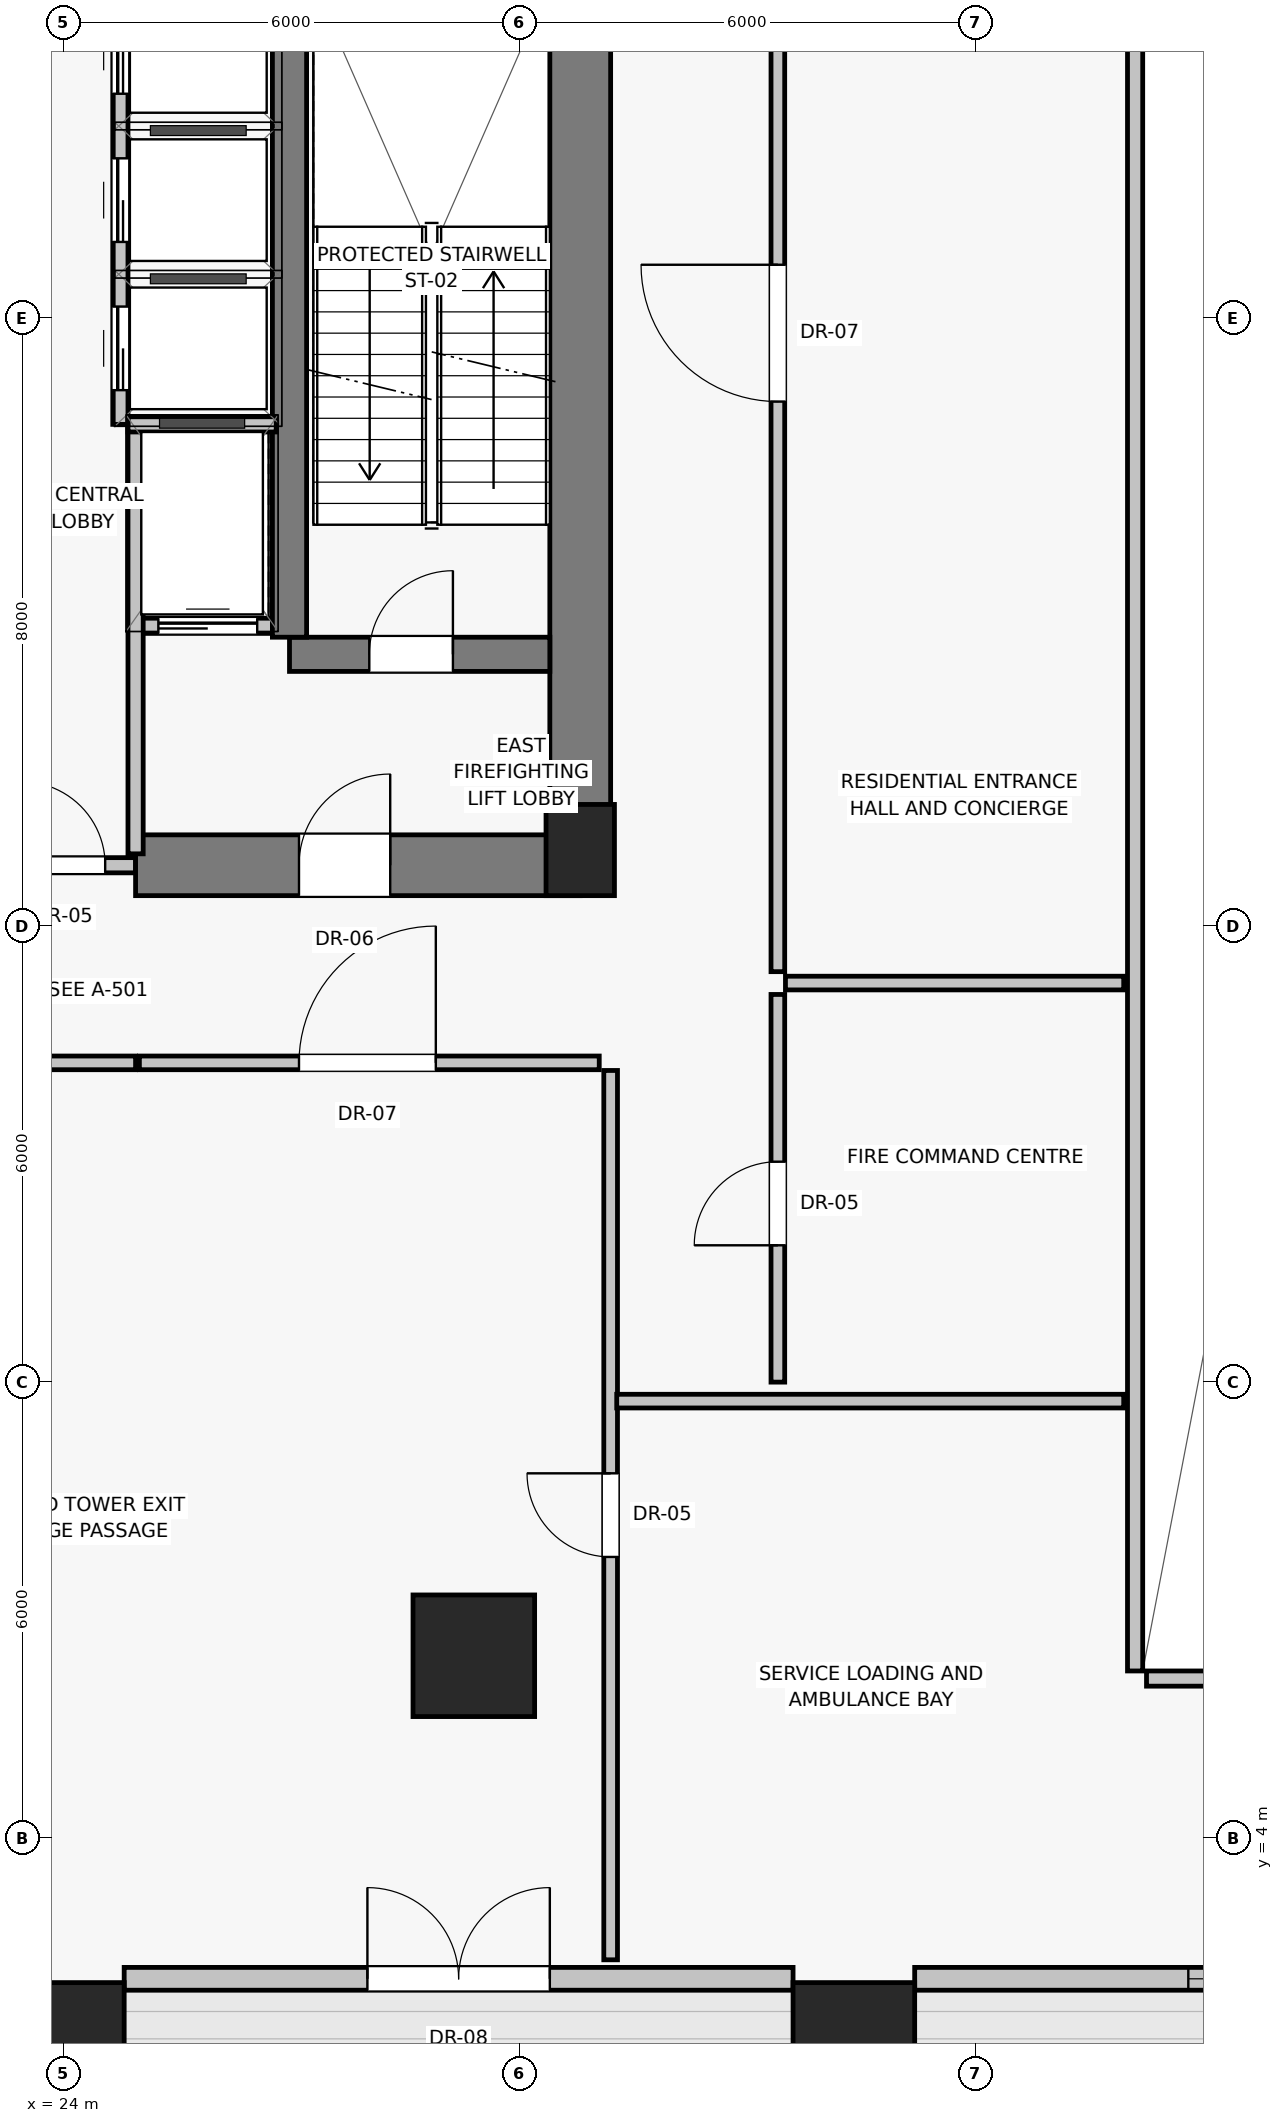
"""IFC4 building model, lengths in metres.
Left out: names, types, materials, properties, quantities, classifications, styles, units other than length and angle.
Written with IfcOpenShell. Run it as: python <this file> out.ifc"""

import sys

from ifc_helpers import new_model, si_unit, direction, frame, frame_2d, origin, origin_2d, place, context, subcontext, project, spatial, rectangle, extrude, source, transform, mapped, element, fill, save


model = new_model("IFC4")
c1 = context("Model", 3, precision=1e-05, world=origin(), true_north=direction((0.0, 1.0)))
c2 = subcontext(c1, "Body", "Model", "MODEL_VIEW")
j1 = project(units=[si_unit("LENGTHUNIT", "METRE"), si_unit("PLANEANGLEUNIT", "RADIAN")], contexts=[c1])
p1 = place(None, origin())
s1 = spatial("IfcSite", under=j1, at=p1, CompositionType="ELEMENT")
p2 = place(p1, origin())
s2 = spatial("IfcBuilding", under=s1, at=p2, CompositionType="ELEMENT")
p3 = place(p2, origin())
s3 = spatial("IfcBuildingStorey", under=s2, at=p3, CompositionType="ELEMENT", Elevation=0.0)
p4 = place(p3, frame((30.8, 17.0, 0.0), z_axis=(0.0, 0.0, 1.0), x_axis=(1.0, 0.0, 0.0)))
e1 = element("IfcColumn", 1, at=p4, inside=s3, PredefinedType="PILASTER", context=c2, shape_type="SweptSolid", body=[
    extrude(rectangle(XDim=0.9, YDim=1.2, at=origin_2d()), origin(), (0.0, 0.0, 1.0), 5.2),
])
for number, where, z_axis, x_axis in (
    (2, (24.0, 1.3, 0.0), (0.0, 0.0, 1.0), (1.0, 0.0, 0.0)),
    (3, (34.4, 1.3, 0.0), (0.0, 0.0, 1.0), (1.0, 0.0, 0.0)),
    (4, (29.4, 6.4, 0.0), (0.0, 0.0, 1.0), (1.0, 0.0, 0.0)),
):
    element("IfcColumn", number, at=place(p3, frame(where, z_axis=z_axis, x_axis=x_axis)), inside=s3, PredefinedType="COLUMN", context=c2, shape_type="SweptSolid", body=[
        extrude(rectangle(XDim=1.6, YDim=1.6, at=origin_2d()), origin(), (0.0, 0.0, 1.0), 5.2),
    ])
p5 = place(p3, frame((24.8, 2.15, 0.0), z_axis=(0.0, 0.0, 1.0), x_axis=(1.0, 0.0, 0.0)))
e5 = element("IfcWall", 5, at=p5, inside=s3, PredefinedType="SOLIDWALL", context=c2, shape_type="SweptSolid", body=[
    extrude(rectangle(XDim=8.8, YDim=0.3, at=frame_2d((4.4, 0.0))), origin(), (0.0, 0.0, 1.0), 3.8),
])
p6 = place(p5, frame((3.2, 0.0, 0.0)))
e6 = element("IfcOpeningElement", 6, at=p6, cuts=e5, PredefinedType="OPENING", context=c2, shape_type="SweptSolid", body=[
    extrude(rectangle(XDim=2.4, YDim=2.5, at=frame_2d((1.2, 1.25))), frame((0.0, 0.16, 0.0), z_axis=(0.0, -1.0, 0.0), x_axis=(1.0, 0.0, 0.0)), (0.0, 0.0, 1.0), 0.32),
])
p7 = place(p3, frame((35.2, 2.15, 0.0), z_axis=(0.0, 0.0, 1.0), x_axis=(1.0, 0.0, 0.0)))
e7 = element("IfcWall", 7, at=p7, inside=s3, PredefinedType="SOLIDWALL", context=c2, shape_type="SweptSolid", body=[
    extrude(rectangle(XDim=10.8, YDim=0.3, at=frame_2d((5.4, 0.0))), origin(), (0.0, 0.0, 1.0), 3.8),
])
p8 = place(p7, frame((3.6, 0.0, 0.9)))
e8 = element("IfcOpeningElement", 8, at=p8, cuts=e7, PredefinedType="OPENING", context=c2, shape_type="SweptSolid", body=[
    extrude(rectangle(XDim=3.0, YDim=2.4, at=frame_2d((1.5, 1.2))), frame((0.0, 0.16, 0.0), z_axis=(0.0, -1.0, 0.0), x_axis=(1.0, 0.0, 0.0)), (0.0, 0.0, 1.0), 0.32),
])
p9 = place(p3, frame((38.1, 6.2, 0.0), z_axis=(0.0, 0.0, 1.0), x_axis=(0.0, 1.0, 0.0)))
e9 = element("IfcWall", 9, at=p9, inside=s3, PredefinedType="SOLIDWALL", context=c2, shape_type="SweptSolid", body=[
    extrude(rectangle(XDim=33.8, YDim=0.2, at=frame_2d((16.9, 0.0))), origin(), (0.0, 0.0, 1.0), 4.9),
])
p10 = place(p3, frame((38.25, 6.1, 0.0), z_axis=(0.0, 0.0, 1.0), x_axis=(1.0, 0.0, 0.0)))
e10 = element("IfcWall", 10, at=p10, inside=s3, PredefinedType="SOLIDWALL", context=c2, shape_type="SweptSolid", body=[
    extrude(rectangle(XDim=6.4, YDim=0.2, at=frame_2d((3.2, 0.0))), origin(), (0.0, 0.0, 1.0), 4.9),
])
p11 = place(p3, frame((30.8, 16.8, 0.0), z_axis=(0.0, 0.0, 1.0), x_axis=(0.0, 1.0, 0.0)))
e11 = element("IfcWall", 11, at=p11, inside=s3, PredefinedType="SHEAR", context=c2, shape_type="SweptSolid", body=[
    extrude(rectangle(XDim=14.2, YDim=0.8, at=frame_2d((7.1, 0.0))), origin(), (0.0, 0.0, 1.0), 4.9),
])
p12 = place(p3, frame((23.05, 16.8, 0.0), z_axis=(0.0, 0.0, 1.0), x_axis=(1.0, 0.0, 0.0)))
e12 = element("IfcWall", 12, at=p12, inside=s3, PredefinedType="SOLIDWALL", context=c2, shape_type="SweptSolid", body=[
    extrude(rectangle(XDim=1.9, YDim=0.2, at=frame_2d((0.95, 0.0))), origin(), (0.0, 0.0, 1.0), 4.05),
])
p13 = place(p12, frame((0.4, 0.0, 0.0)))
e13 = element("IfcOpeningElement", 13, at=p13, cuts=e12, PredefinedType="OPENING", context=c2, shape_type="SweptSolid", body=[
    extrude(rectangle(XDim=1.1, YDim=2.03, at=frame_2d((0.55, 1.015))), frame((0.0, 0.11, 0.0), z_axis=(0.0, -1.0, 0.0), x_axis=(1.0, 0.0, 0.0)), (0.0, 0.0, 1.0), 0.22),
])
p14 = place(p3, frame((24.95, 16.8, 0.0), z_axis=(0.0, 0.0, 1.0), x_axis=(1.0, 0.0, 0.0)))
e14 = element("IfcWall", 14, at=p14, inside=s3, PredefinedType="SHEAR", context=c2, shape_type="SweptSolid", body=[
    extrude(rectangle(XDim=5.85, YDim=0.8, at=frame_2d((2.925, 0.0))), origin(), (0.0, 0.0, 1.0), 4.9),
])
p15 = place(p14, frame((2.15, 0.0, 0.0)))
e15 = element("IfcOpeningElement", 15, at=p15, cuts=e14, PredefinedType="OPENING", context=c2, shape_type="SweptSolid", body=[
    extrude(rectangle(XDim=1.2, YDim=2.03, at=frame_2d((0.6, 1.015))), frame((0.0, 0.41, 0.0), z_axis=(0.0, -1.0, 0.0), x_axis=(1.0, 0.0, 0.0)), (0.0, 0.0, 1.0), 0.82),
])
p16 = place(p3, frame((24.95, 19.95, 0.0), z_axis=(0.0, 0.0, 1.0), x_axis=(1.0, 0.0, 0.0)))
e16 = element("IfcWall", 16, at=p16, inside=s3, PredefinedType="SOLIDWALL", context=c2, shape_type="SweptSolid", body=[
    extrude(rectangle(XDim=1.85, YDim=0.2, at=frame_2d((0.925, 0.0))), origin(), (0.0, 0.0, 1.0), 4.9),
])
p17 = place(p16, frame((0.3, 0.0, 0.0)))
e17 = element("IfcOpeningElement", 17, at=p17, cuts=e16, PredefinedType="OPENING", context=c2, shape_type="SweptSolid", body=[
    extrude(rectangle(XDim=1.3, YDim=2.25, at=frame_2d((0.65, 1.125))), frame((0.0, 0.11, 0.0), z_axis=(0.0, -1.0, 0.0), x_axis=(1.0, 0.0, 0.0)), (0.0, 0.0, 1.0), 0.22),
])
p18 = place(p3, frame((26.975, 19.575, 0.0), z_axis=(0.0, 0.0, 1.0), x_axis=(1.0, 0.0, 0.0)))
e18 = element("IfcWall", 18, at=p18, inside=s3, PredefinedType="SHEAR", context=c2, shape_type="SweptSolid", body=[
    extrude(rectangle(XDim=3.425, YDim=0.45, at=frame_2d((1.712, 0.0))), origin(), (0.0, 0.0, 1.0), 4.9),
])
p19 = place(p18, frame((1.05, 0.0, 0.0)))
e19 = element("IfcOpeningElement", 19, at=p19, cuts=e18, PredefinedType="OPENING", context=c2, shape_type="SweptSolid", body=[
    extrude(rectangle(XDim=1.1, YDim=2.03, at=frame_2d((0.55, 1.015))), frame((0.0, 0.235, 0.0), z_axis=(0.0, -1.0, 0.0), x_axis=(1.0, 0.0, 0.0)), (0.0, 0.0, 1.0), 0.47),
])
p20 = place(p3, frame((26.975, 19.8, 0.0), z_axis=(0.0, 0.0, 1.0), x_axis=(0.0, 1.0, 0.0)))
e20 = element("IfcWall", 20, at=p20, inside=s3, PredefinedType="SHEAR", context=c2, shape_type="SweptSolid", body=[
    extrude(rectangle(XDim=8.825, YDim=0.45, at=frame_2d((4.413, 0.0))), origin(), (0.0, 0.0, 1.0), 4.9),
])
p21 = place(p3, frame((24.95, 16.95, 0.0), z_axis=(0.0, 0.0, 1.0), x_axis=(0.0, 1.0, 0.0)))
e21 = element("IfcWall", 21, at=p21, inside=s3, PredefinedType="SOLIDWALL", context=c2, shape_type="SweptSolid", body=[
    extrude(rectangle(XDim=5.6, YDim=0.2, at=frame_2d((2.8, 0.0))), origin(), (0.0, 0.0, 1.0), 4.9),
])
p22 = place(p3, frame((24.85, 22.6, 0.0), z_axis=(0.0, 0.0, 1.0), x_axis=(1.0, 0.0, 0.0)))
e22 = element("IfcWall", 22, at=p22, inside=s3, PredefinedType="SOLIDWALL", context=c2, shape_type="SweptSolid", body=[
    extrude(rectangle(XDim=1.95, YDim=0.2, at=frame_2d((0.975, 0.0))), origin(), (0.0, 0.0, 1.0), 4.9),
])
p23 = place(p3, frame((24.75, 22.6, 0.0), z_axis=(0.0, 0.0, 1.0), x_axis=(0.0, 1.0, 0.0)))
e23 = element("IfcWall", 23, at=p23, inside=s3, PredefinedType="SOLIDWALL", context=c2, shape_type="SweptSolid", body=[
    extrude(rectangle(XDim=5.95, YDim=0.2, at=frame_2d((2.975, 0.0))), origin(), (0.0, 0.0, 1.0), 4.9),
])
p24 = place(p23, frame((0.45, 0.0, 0.0)))
e24 = element("IfcOpeningElement", 24, at=p24, cuts=e23, PredefinedType="OPENING", context=c2, shape_type="SweptSolid", body=[
    extrude(rectangle(XDim=1.1, YDim=2.08, at=frame_2d((0.55, 1.04))), frame((0.0, 0.11, 0.0), z_axis=(0.0, -1.0, 0.0), x_axis=(1.0, 0.0, 0.0)), (0.0, 0.0, 1.0), 0.22),
])
p25 = place(p23, frame((2.4, 0.0, 0.0)))
e25 = element("IfcOpeningElement", 25, at=p25, cuts=e23, PredefinedType="OPENING", context=c2, shape_type="SweptSolid", body=[
    extrude(rectangle(XDim=1.1, YDim=2.08, at=frame_2d((0.55, 1.04))), frame((0.0, 0.11, 0.0), z_axis=(0.0, -1.0, 0.0), x_axis=(1.0, 0.0, 0.0)), (0.0, 0.0, 1.0), 0.22),
])
p26 = place(p23, frame((4.35, 0.0, 0.0)))
e26 = element("IfcOpeningElement", 26, at=p26, cuts=e23, PredefinedType="OPENING", context=c2, shape_type="SweptSolid", body=[
    extrude(rectangle(XDim=1.1, YDim=2.08, at=frame_2d((0.55, 1.04))), frame((0.0, 0.11, 0.0), z_axis=(0.0, -1.0, 0.0), x_axis=(1.0, 0.0, 0.0)), (0.0, 0.0, 1.0), 0.22),
])
p27 = place(p3, frame((25.0, 14.2, 0.0), z_axis=(0.0, 0.0, 1.0), x_axis=(1.0, 0.0, 0.0)))
e27 = element("IfcWall", 27, at=p27, inside=s3, PredefinedType="PARTITIONING", context=c2, shape_type="SweptSolid", body=[
    extrude(rectangle(XDim=6.05, YDim=0.18, at=frame_2d((3.025, 0.0))), origin(), (0.0, 0.0, 1.0), 4.9),
])
p28 = place(p27, frame((2.1, 0.0, 0.0)))
e28 = element("IfcOpeningElement", 28, at=p28, cuts=e27, PredefinedType="OPENING", context=c2, shape_type="SweptSolid", body=[
    extrude(rectangle(XDim=1.8, YDim=2.25, at=frame_2d((0.9, 1.125))), frame((0.0, 0.1, 0.0), z_axis=(0.0, -1.0, 0.0), x_axis=(1.0, 0.0, 0.0)), (0.0, 0.0, 1.0), 0.2),
])
p29 = place(p3, frame((23.05, 14.2, 0.0), z_axis=(0.0, 0.0, 1.0), x_axis=(1.0, 0.0, 0.0)))
e29 = element("IfcWall", 29, at=p29, inside=s3, PredefinedType="PARTITIONING", context=c2, shape_type="SweptSolid", body=[
    extrude(rectangle(XDim=1.9, YDim=0.18, at=frame_2d((0.95, 0.0))), origin(), (0.0, 0.0, 1.0), 4.9),
])
p30 = place(p3, frame((31.2, 2.4, 0.0), z_axis=(0.0, 0.0, 1.0), x_axis=(0.0, 1.0, 0.0)))
e30 = element("IfcWall", 30, at=p30, inside=s3, PredefinedType="PARTITIONING", context=c2, shape_type="SweptSolid", body=[
    extrude(rectangle(XDim=11.7, YDim=0.18, at=frame_2d((5.85, 0.0))), origin(), (0.0, 0.0, 1.0), 4.9),
])
p31 = place(p30, frame((5.3, 0.0, 0.0)))
e31 = element("IfcOpeningElement", 31, at=p31, cuts=e30, PredefinedType="OPENING", context=c2, shape_type="SweptSolid", body=[
    extrude(rectangle(XDim=1.1, YDim=2.03, at=frame_2d((0.55, 1.015))), frame((0.0, 0.1, 0.0), z_axis=(0.0, -1.0, 0.0), x_axis=(1.0, 0.0, 0.0)), (0.0, 0.0, 1.0), 0.2),
])
p32 = place(p3, frame((33.4, 10.0, 0.0), z_axis=(0.0, 0.0, 1.0), x_axis=(0.0, 1.0, 0.0)))
e32 = element("IfcWall", 32, at=p32, inside=s3, PredefinedType="PARTITIONING", context=c2, shape_type="SweptSolid", body=[
    extrude(rectangle(XDim=5.1, YDim=0.18, at=frame_2d((2.55, 0.0))), origin(), (0.0, 0.0, 1.0), 4.9),
])
p33 = place(p32, frame((1.8, 0.0, 0.0)))
e33 = element("IfcOpeningElement", 33, at=p33, cuts=e32, PredefinedType="OPENING", context=c2, shape_type="SweptSolid", body=[
    extrude(rectangle(XDim=1.1, YDim=2.03, at=frame_2d((0.55, 1.015))), frame((0.0, 0.1, 0.0), z_axis=(0.0, -1.0, 0.0), x_axis=(1.0, 0.0, 0.0)), (0.0, 0.0, 1.0), 0.2),
])
p34 = place(p3, frame((33.4, 15.4, 0.0), z_axis=(0.0, 0.0, 1.0), x_axis=(0.0, 1.0, 0.0)))
e34 = element("IfcWall", 34, at=p34, inside=s3, PredefinedType="PARTITIONING", context=c2, shape_type="SweptSolid", body=[
    extrude(rectangle(XDim=18.0, YDim=0.18, at=frame_2d((9.0, 0.0))), origin(), (0.0, 0.0, 1.0), 4.9),
])
p35 = place(p34, frame((7.5, 0.0, 0.0)))
e35 = element("IfcOpeningElement", 35, at=p35, cuts=e34, PredefinedType="OPENING", context=c2, shape_type="SweptSolid", body=[
    extrude(rectangle(XDim=1.8, YDim=2.25, at=frame_2d((0.9, 1.125))), frame((0.0, 0.1, 0.0), z_axis=(0.0, -1.0, 0.0), x_axis=(1.0, 0.0, 0.0)), (0.0, 0.0, 1.0), 0.2),
])
p36 = place(p3, frame((31.28, 9.75, 0.0), z_axis=(0.0, 0.0, 1.0), x_axis=(1.0, 0.0, 0.0)))
e36 = element("IfcWall", 36, at=p36, inside=s3, PredefinedType="PARTITIONING", context=c2, shape_type="SweptSolid", body=[
    extrude(rectangle(XDim=6.67, YDim=0.18, at=frame_2d((3.335, 0.0))), origin(), (0.0, 0.0, 1.0), 4.9),
])
p37 = place(p3, frame((33.5, 15.25, 0.0), z_axis=(0.0, 0.0, 1.0), x_axis=(1.0, 0.0, 0.0)))
e37 = element("IfcWall", 37, at=p37, inside=s3, PredefinedType="PARTITIONING", context=c2, shape_type="SweptSolid", body=[
    extrude(rectangle(XDim=4.45, YDim=0.18, at=frame_2d((2.225, 0.0))), origin(), (0.0, 0.0, 1.0), 4.9),
])
m1 = source(origin(), c2, "Body", "SweptSolid", [
    extrude(rectangle(XDim=2.4, YDim=2.5, at=frame_2d((1.2, 1.25))), frame((0.0, 0.025, 0.0), z_axis=(0.0, -1.0, 0.0), x_axis=(1.0, 0.0, 0.0)), (0.0, 0.0, 1.0), 0.05),
])
p38 = place(p6, frame((2.4, 0.0, 0.0), z_axis=(0.0, 0.0, 1.0), x_axis=(-1.0, 0.0, 0.0)))
e38 = element("IfcDoor", 38, at=p38, inside=s3, OperationType="DOUBLE_SWING_LEFT", PredefinedType="DOOR", context=c2, shape_type="MappedRepresentation", body=[
    mapped(m1, transform((0.0, 0.0, 0.0), scale=1.0)),
])
fill(e6, e38)
m2 = source(origin(), c2, "Body", "SweptSolid", [
    extrude(rectangle(XDim=3.0, YDim=2.4, at=frame_2d((1.5, 1.2))), frame((0.0, 0.03, 0.0), z_axis=(0.0, -1.0, 0.0), x_axis=(1.0, 0.0, 0.0)), (0.0, 0.0, 1.0), 0.06),
])
p39 = place(p8, origin())
e39 = element("IfcWindow", 39, at=p39, inside=s3, PartitioningType="DOUBLE_PANEL_VERTICAL", PredefinedType="WINDOW", context=c2, shape_type="MappedRepresentation", body=[
    mapped(m2, transform((0.0, 0.0, 0.0), scale=1.0)),
])
fill(e8, e39)
m3 = source(origin(), c2, "Body", "SweptSolid", [
    extrude(rectangle(XDim=1.1, YDim=2.03, at=frame_2d((0.55, 1.015))), frame((0.0, 0.025, 0.0), z_axis=(0.0, -1.0, 0.0), x_axis=(1.0, 0.0, 0.0)), (0.0, 0.0, 1.0), 0.05),
])
p40 = place(p13, origin())
e40 = element("IfcDoor", 40, at=p40, inside=s3, OperationType="SINGLE_SWING_LEFT", PredefinedType="DOOR", context=c2, shape_type="MappedRepresentation", body=[
    mapped(m3, transform((0.0, 0.0, 0.0), scale=1.0)),
])
fill(e13, e40)
m4 = source(origin(), c2, "Body", "SweptSolid", [
    extrude(rectangle(XDim=1.2, YDim=2.03, at=frame_2d((0.6, 1.015))), frame((0.0, 0.025, 0.0), z_axis=(0.0, -1.0, 0.0), x_axis=(1.0, 0.0, 0.0)), (0.0, 0.0, 1.0), 0.05),
])
p41 = place(p15, origin())
e41 = element("IfcDoor", 41, at=p41, inside=s3, OperationType="SINGLE_SWING_RIGHT", PredefinedType="DOOR", context=c2, shape_type="MappedRepresentation", body=[
    mapped(m4, transform((0.0, 0.0, 0.0), scale=1.0)),
])
fill(e15, e41)
m5 = source(origin(), c2, "Body", "SweptSolid", [
    extrude(rectangle(XDim=1.3, YDim=2.25, at=frame_2d((0.65, 1.125))), frame((0.0, 0.025, 0.0), z_axis=(0.0, -1.0, 0.0), x_axis=(1.0, 0.0, 0.0)), (0.0, 0.0, 1.0), 0.05),
])
p42 = place(p17, origin())
e42 = element("IfcDoor", 42, at=p42, inside=s3, OperationType="SLIDING_TO_LEFT", PredefinedType="DOOR", context=c2, shape_type="MappedRepresentation", body=[
    mapped(m5, transform((0.0, 0.0, 0.0), scale=1.0)),
])
fill(e17, e42)
p43 = place(p19, origin())
e43 = element("IfcDoor", 43, at=p43, inside=s3, OperationType="SINGLE_SWING_RIGHT", PredefinedType="DOOR", context=c2, shape_type="MappedRepresentation", body=[
    mapped(m3, transform((0.0, 0.0, 0.0), scale=1.0)),
])
fill(e19, e43)
m6 = source(origin(), c2, "Body", "SweptSolid", [
    extrude(rectangle(XDim=1.1, YDim=2.08, at=frame_2d((0.55, 1.04))), frame((0.0, 0.025, 0.0), z_axis=(0.0, -1.0, 0.0), x_axis=(1.0, 0.0, 0.0)), (0.0, 0.0, 1.0), 0.05),
])
p44 = place(p24, origin())
e44 = element("IfcDoor", 44, at=p44, inside=s3, OperationType="SLIDING_TO_LEFT", PredefinedType="DOOR", context=c2, shape_type="MappedRepresentation", body=[
    mapped(m6, transform((0.0, 0.0, 0.0), scale=1.0)),
])
fill(e24, e44)
p45 = place(p25, origin())
e45 = element("IfcDoor", 45, at=p45, inside=s3, OperationType="SLIDING_TO_LEFT", PredefinedType="DOOR", context=c2, shape_type="MappedRepresentation", body=[
    mapped(m6, transform((0.0, 0.0, 0.0), scale=1.0)),
])
fill(e25, e45)
p46 = place(p26, origin())
e46 = element("IfcDoor", 46, at=p46, inside=s3, OperationType="SLIDING_TO_LEFT", PredefinedType="DOOR", context=c2, shape_type="MappedRepresentation", body=[
    mapped(m6, transform((0.0, 0.0, 0.0), scale=1.0)),
])
fill(e26, e46)
m7 = source(origin(), c2, "Body", "SweptSolid", [
    extrude(rectangle(XDim=1.8, YDim=2.25, at=frame_2d((0.9, 1.125))), frame((0.0, 0.025, 0.0), z_axis=(0.0, -1.0, 0.0), x_axis=(1.0, 0.0, 0.0)), (0.0, 0.0, 1.0), 0.05),
])
p47 = place(p28, origin())
e47 = element("IfcDoor", 47, at=p47, inside=s3, OperationType="SINGLE_SWING_RIGHT", PredefinedType="DOOR", context=c2, shape_type="MappedRepresentation", body=[
    mapped(m7, transform((0.0, 0.0, 0.0), scale=1.0)),
])
fill(e28, e47)
p48 = place(p31, origin())
e48 = element("IfcDoor", 48, at=p48, inside=s3, OperationType="SINGLE_SWING_RIGHT", PredefinedType="DOOR", context=c2, shape_type="MappedRepresentation", body=[
    mapped(m3, transform((0.0, 0.0, 0.0), scale=1.0)),
])
fill(e31, e48)
p49 = place(p33, origin())
e49 = element("IfcDoor", 49, at=p49, inside=s3, OperationType="SINGLE_SWING_LEFT", PredefinedType="DOOR", context=c2, shape_type="MappedRepresentation", body=[
    mapped(m3, transform((0.0, 0.0, 0.0), scale=1.0)),
])
fill(e33, e49)
p50 = place(p35, origin())
e50 = element("IfcDoor", 50, at=p50, inside=s3, OperationType="SINGLE_SWING_RIGHT", PredefinedType="DOOR", context=c2, shape_type="MappedRepresentation", body=[
    mapped(m7, transform((0.0, 0.0, 0.0), scale=1.0)),
])
fill(e35, e50)
save(model, sys.argv[1])
